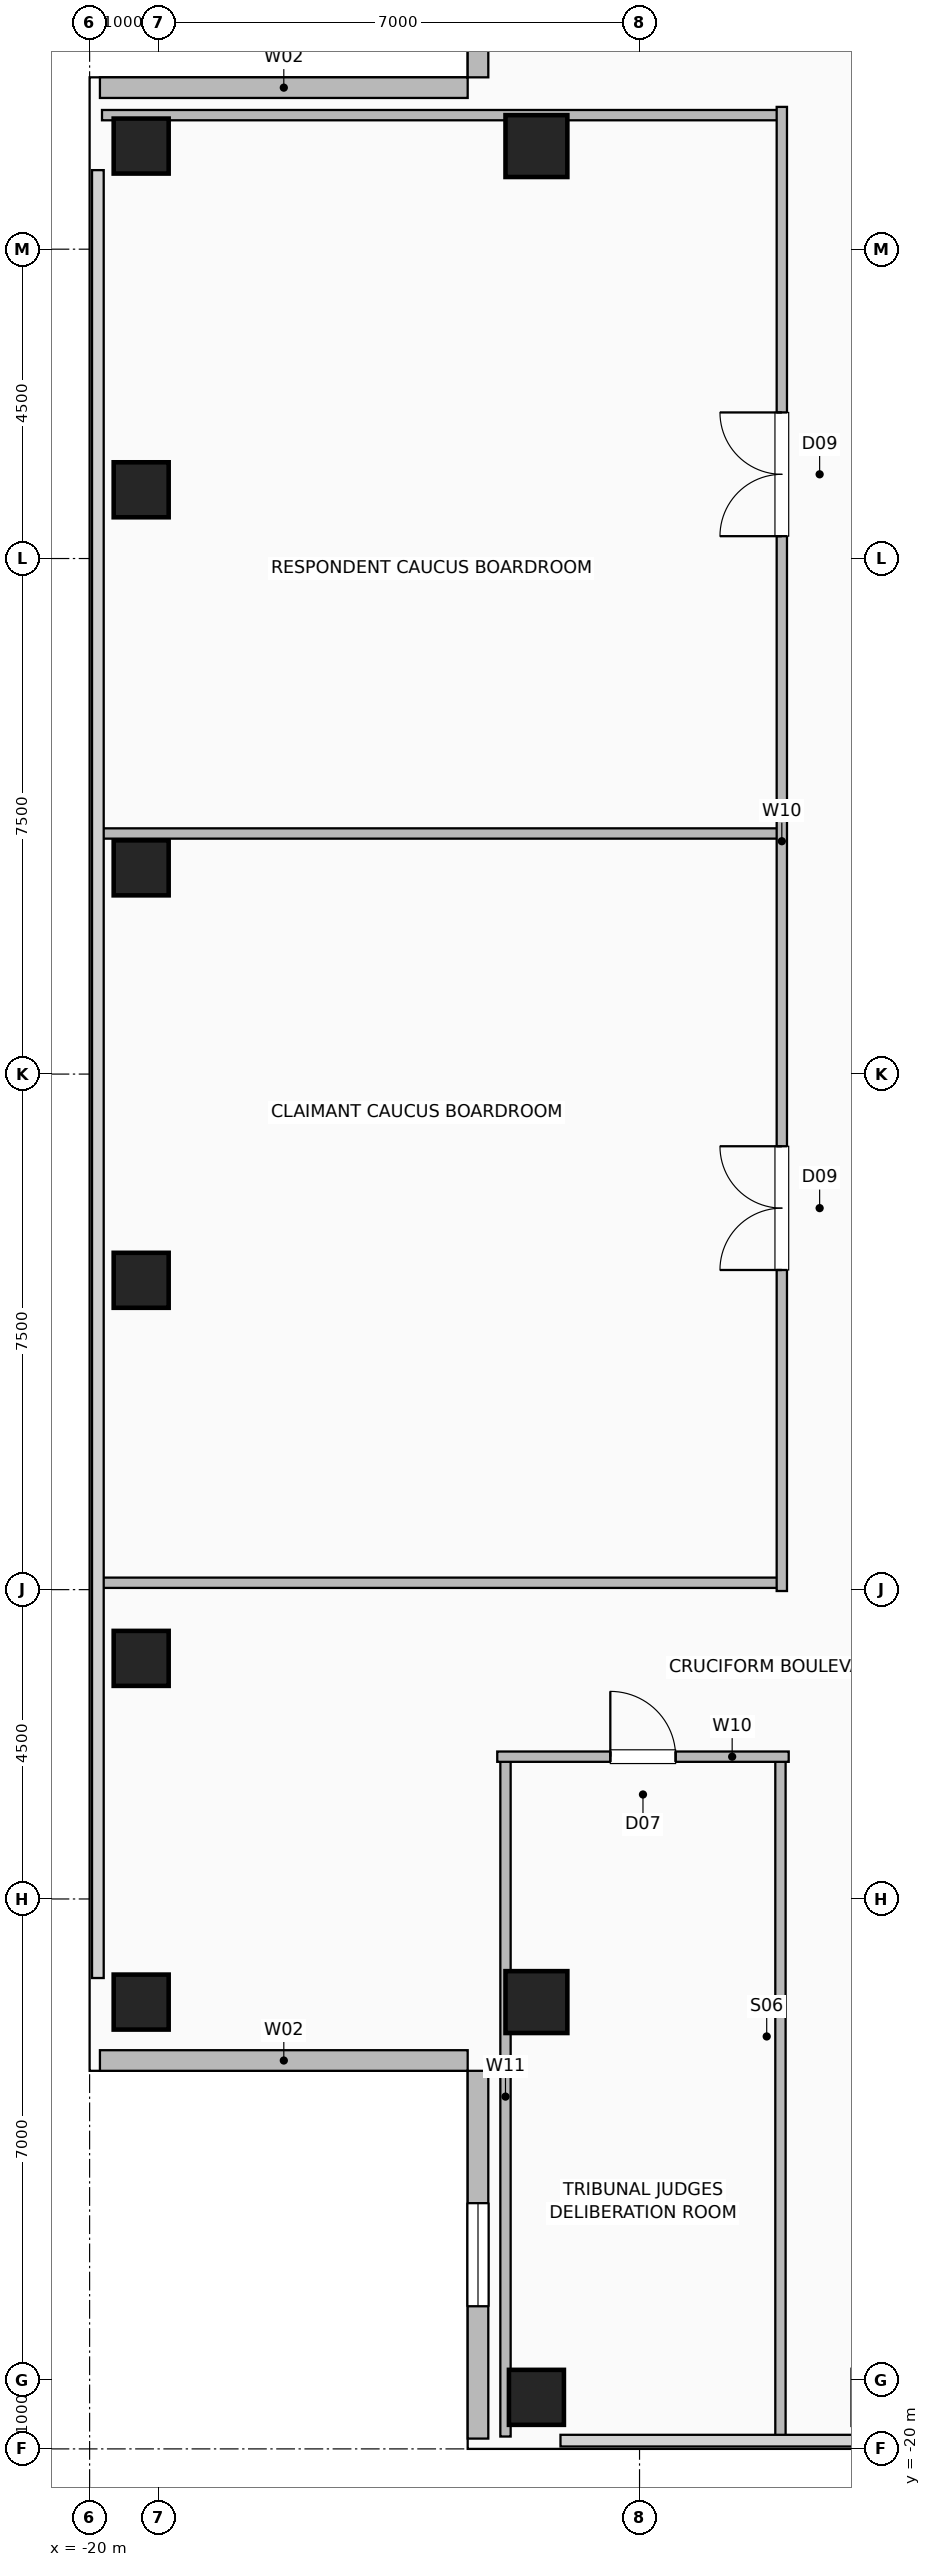
"""IFC4 building model, lengths in metres.
Left out: names, types, materials, properties, quantities, classifications, styles, units other than length and angle.
Written with IfcOpenShell. Run it as: python <this file> out.ifc"""

import sys

from ifc_helpers import new_model, si_unit, direction, frame, frame_2d, origin, origin_2d, place, context, subcontext, project, spatial, rectangle, hollow_rectangle, extrude, element, fill, save


model = new_model("IFC4")
c1 = context("Model", 3, precision=1e-05, world=origin(), true_north=direction((0.0, 1.0)))
c2 = subcontext(c1, "Body", "Model", "MODEL_VIEW")
j1 = project(units=[si_unit("LENGTHUNIT", "METRE"), si_unit("PLANEANGLEUNIT", "RADIAN")], contexts=[c1])
p1 = place(None, origin())
s1 = spatial("IfcSite", under=j1, at=p1, CompositionType="ELEMENT")
p2 = place(p1, origin())
s2 = spatial("IfcBuilding", under=s1, at=p2, CompositionType="ELEMENT")
p3 = place(p2, frame((0.0, 0.0, 187.8)))
s3 = spatial("IfcBuildingStorey", under=s2, at=p3, CompositionType="ELEMENT", Elevation=187.8)
for number, where, z_axis, x_axis in (
    (1, (-13.5, -19.25, 0.0), (0.0, 0.0, 1.0), (1.0, 0.0, 0.0)),
    (2, (-19.25, -13.5, 0.0), (0.0, 0.0, 1.0), (1.0, 0.0, 0.0)),
    (3, (-19.25, -8.5, 0.0), (0.0, 0.0, 1.0), (1.0, 0.0, 0.0)),
    (4, (-19.25, -3.0, 0.0), (0.0, 0.0, 1.0), (1.0, 0.0, 0.0)),
    (5, (-19.25, 3.0, 0.0), (0.0, 0.0, 1.0), (1.0, 0.0, 0.0)),
    (6, (-19.25, 8.5, 0.0), (0.0, 0.0, 1.0), (1.0, 0.0, 0.0)),
    (7, (-19.25, 13.5, 0.0), (0.0, 0.0, 1.0), (1.0, 0.0, 0.0)),
):
    element("IfcColumn", number, at=place(p3, frame(where, z_axis=z_axis, x_axis=x_axis)), inside=s3, PredefinedType="COLUMN", context=c2, shape_type="SweptSolid", body=[
        extrude(hollow_rectangle(XDim=0.8, YDim=0.8, WallThickness=0.04, at=origin_2d()), origin(), (0.0, 0.0, 1.0), 3.6),
    ])
for number, where, z_axis, x_axis in (
    (8, (-13.5, -13.5, 0.0), (0.0, 0.0, 1.0), (1.0, 0.0, 0.0)),
    (9, (-13.5, 13.5, 0.0), (0.0, 0.0, 1.0), (1.0, 0.0, 0.0)),
):
    element("IfcColumn", number, at=place(p3, frame(where, z_axis=z_axis, x_axis=x_axis)), inside=s3, PredefinedType="COLUMN", context=c2, shape_type="SweptSolid", body=[
        extrude(hollow_rectangle(XDim=0.9, YDim=0.9, WallThickness=0.045, at=origin_2d()), origin(), (0.0, 0.0, 1.0), 3.6),
    ])
p4 = place(p3, frame((-14.35, -19.85, 0.0), z_axis=(0.0, 0.0, 1.0), x_axis=(0.0, 1.0, 0.0)))
e10 = element("IfcWall", 10, at=p4, inside=s3, PredefinedType="SOLIDWALL", context=c2, shape_type="SweptSolid", body=[
    extrude(rectangle(XDim=5.35, YDim=0.3, at=frame_2d((2.675, 0.0))), origin(), (0.0, 0.0, 1.0), 3.36),
])
p5 = place(p4, frame((1.925, 0.0, 0.9)))
e11 = element("IfcOpeningElement", 11, at=p5, cuts=e10, PredefinedType="OPENING", context=c2, shape_type="SweptSolid", body=[
    extrude(rectangle(XDim=1.5, YDim=1.8, at=frame_2d((0.75, 0.9))), frame((0.0, 0.16, 0.0), z_axis=(0.0, -1.0, 0.0), x_axis=(1.0, 0.0, 0.0)), (0.0, 0.0, 1.0), 0.32),
])
p6 = place(p3, frame((-19.85, -14.35, 0.0), z_axis=(0.0, 0.0, 1.0), x_axis=(1.0, 0.0, 0.0)))
e12 = element("IfcWall", 12, at=p6, inside=s3, PredefinedType="SOLIDWALL", context=c2, shape_type="SweptSolid", body=[
    extrude(rectangle(XDim=5.35, YDim=0.3, at=frame_2d((2.675, 0.0))), origin(), (0.0, 0.0, 1.0), 3.36),
])
p7 = place(p3, frame((-14.35, 19.85, 0.0), z_axis=(0.0, 0.0, 1.0), x_axis=(0.0, -1.0, 0.0)))
e13 = element("IfcWall", 13, at=p7, inside=s3, PredefinedType="SOLIDWALL", context=c2, shape_type="SweptSolid", body=[
    extrude(rectangle(XDim=5.35, YDim=0.3, at=frame_2d((2.675, 0.0))), origin(), (0.0, 0.0, 1.0), 3.36),
])
p8 = place(p7, frame((1.925, 0.0, 0.9)))
e14 = element("IfcOpeningElement", 14, at=p8, cuts=e13, PredefinedType="OPENING", context=c2, shape_type="SweptSolid", body=[
    extrude(rectangle(XDim=1.5, YDim=1.8, at=frame_2d((0.75, 0.9))), frame((0.0, 0.16, 0.0), z_axis=(0.0, -1.0, 0.0), x_axis=(1.0, 0.0, 0.0)), (0.0, 0.0, 1.0), 0.32),
])
p9 = place(p3, frame((-19.85, 14.35, 0.0), z_axis=(0.0, 0.0, 1.0), x_axis=(1.0, 0.0, 0.0)))
e15 = element("IfcWall", 15, at=p9, inside=s3, PredefinedType="SOLIDWALL", context=c2, shape_type="SweptSolid", body=[
    extrude(rectangle(XDim=5.35, YDim=0.3, at=frame_2d((2.675, 0.0))), origin(), (0.0, 0.0, 1.0), 3.36),
])
for number, where, z_axis, x_axis in (
    (16, (-13.95, -19.82, 0.0), (0.0, 0.0, 1.0), (0.0, 1.0, 0.0)),
    (17, (-9.95, -19.82, 0.0), (0.0, 0.0, 1.0), (0.0, 1.0, 0.0)),
):
    element("IfcWall", number, at=place(p3, frame(where, z_axis=z_axis, x_axis=x_axis)), inside=s3, PredefinedType="PARTITIONING", context=c2, shape_type="SweptSolid", body=[
        extrude(rectangle(XDim=9.89, YDim=0.15, at=frame_2d((4.945, 0.0))), origin(), (0.0, 0.0, 1.0), 3.36),
    ])
p10 = place(p3, frame((-14.07, -9.93, 0.0), z_axis=(0.0, 0.0, 1.0), x_axis=(1.0, 0.0, 0.0)))
e18 = element("IfcWall", 18, at=p10, inside=s3, PredefinedType="PARTITIONING", context=c2, shape_type="SweptSolid", body=[
    extrude(rectangle(XDim=4.24, YDim=0.15, at=frame_2d((2.12, 0.0))), origin(), (0.0, 0.0, 1.0), 3.36),
])
p11 = place(p10, frame((1.645, 0.0, 0.0)))
e19 = element("IfcOpeningElement", 19, at=p11, cuts=e18, PredefinedType="OPENING", context=c2, shape_type="SweptSolid", body=[
    extrude(rectangle(XDim=0.95, YDim=2.06, at=frame_2d((0.475, 1.03))), frame((0.0, 0.085, 0.0), z_axis=(0.0, -1.0, 0.0), x_axis=(1.0, 0.0, 0.0)), (0.0, 0.0, 1.0), 0.17),
])
for number, where, z_axis, x_axis in (
    (20, (-19.82, -7.4, 0.0), (0.0, 0.0, 1.0), (1.0, 0.0, 0.0)),
    (21, (-19.82, 3.5, 0.0), (0.0, 0.0, 1.0), (1.0, 0.0, 0.0)),
    (22, (-19.82, 13.95, 0.0), (0.0, 0.0, 1.0), (1.0, 0.0, 0.0)),
):
    element("IfcWall", number, at=place(p3, frame(where, z_axis=z_axis, x_axis=x_axis)), inside=s3, PredefinedType="PARTITIONING", context=c2, shape_type="SweptSolid", body=[
        extrude(rectangle(XDim=9.89, YDim=0.15, at=frame_2d((4.945, 0.0))), origin(), (0.0, 0.0, 1.0), 3.36),
    ])
p12 = place(p3, frame((-9.93, -7.52, 0.0), z_axis=(0.0, 0.0, 1.0), x_axis=(0.0, 1.0, 0.0)))
e23 = element("IfcWall", 23, at=p12, inside=s3, PredefinedType="PARTITIONING", context=c2, shape_type="SweptSolid", body=[
    extrude(rectangle(XDim=21.59, YDim=0.15, at=frame_2d((10.795, 0.0))), origin(), (0.0, 0.0, 1.0), 3.36),
])
p13 = place(p12, frame((4.67, 0.0, 0.0)))
e24 = element("IfcOpeningElement", 24, at=p13, cuts=e23, PredefinedType="OPENING", context=c2, shape_type="SweptSolid", body=[
    extrude(rectangle(XDim=1.8, YDim=2.08, at=frame_2d((0.9, 1.04))), frame((0.0, 0.085, 0.0), z_axis=(0.0, -1.0, 0.0), x_axis=(1.0, 0.0, 0.0)), (0.0, 0.0, 1.0), 0.17),
])
p14 = place(p12, frame((15.345, 0.0, 0.0)))
e25 = element("IfcOpeningElement", 25, at=p14, cuts=e23, PredefinedType="OPENING", context=c2, shape_type="SweptSolid", body=[
    extrude(rectangle(XDim=1.8, YDim=2.08, at=frame_2d((0.9, 1.04))), frame((0.0, 0.085, 0.0), z_axis=(0.0, -1.0, 0.0), x_axis=(1.0, 0.0, 0.0)), (0.0, 0.0, 1.0), 0.17),
])
p15 = place(p5, origin())
e26 = element("IfcWindow", 26, at=p15, inside=s3, PartitioningType="SINGLE_PANEL", PredefinedType="WINDOW", context=c2, shape_type="SweptSolid", body=[
    extrude(rectangle(XDim=1.5, YDim=1.8, at=frame_2d((0.75, 0.9))), frame((0.0, 0.03, 0.0), z_axis=(0.0, -1.0, 0.0), x_axis=(1.0, 0.0, 0.0)), (0.0, 0.0, 1.0), 0.06),
])
fill(e11, e26)
p16 = place(p11, origin())
e27 = element("IfcDoor", 27, at=p16, inside=s3, OperationType="SINGLE_SWING_LEFT", PredefinedType="DOOR", context=c2, shape_type="SweptSolid", body=[
    extrude(rectangle(XDim=0.95, YDim=2.06, at=frame_2d((0.475, 1.03))), frame((0.0, 0.025, 0.0), z_axis=(0.0, -1.0, 0.0), x_axis=(1.0, 0.0, 0.0)), (0.0, 0.0, 1.0), 0.05),
])
fill(e19, e27)
p17 = place(p13, origin())
e28 = element("IfcDoor", 28, at=p17, inside=s3, OperationType="DOUBLE_DOOR_SINGLE_SWING", PredefinedType="DOOR", context=c2, shape_type="SweptSolid", body=[
    extrude(rectangle(XDim=1.8, YDim=2.08, at=frame_2d((0.9, 1.04))), frame((0.0, 0.025, 0.0), z_axis=(0.0, -1.0, 0.0), x_axis=(1.0, 0.0, 0.0)), (0.0, 0.0, 1.0), 0.05),
])
fill(e24, e28)
p18 = place(p14, origin())
e29 = element("IfcDoor", 29, at=p18, inside=s3, OperationType="DOUBLE_DOOR_SINGLE_SWING", PredefinedType="DOOR", context=c2, shape_type="SweptSolid", body=[
    extrude(rectangle(XDim=1.8, YDim=2.08, at=frame_2d((0.9, 1.04))), frame((0.0, 0.025, 0.0), z_axis=(0.0, -1.0, 0.0), x_axis=(1.0, 0.0, 0.0)), (0.0, 0.0, 1.0), 0.05),
])
fill(e25, e29)
save(model, sys.argv[1])
